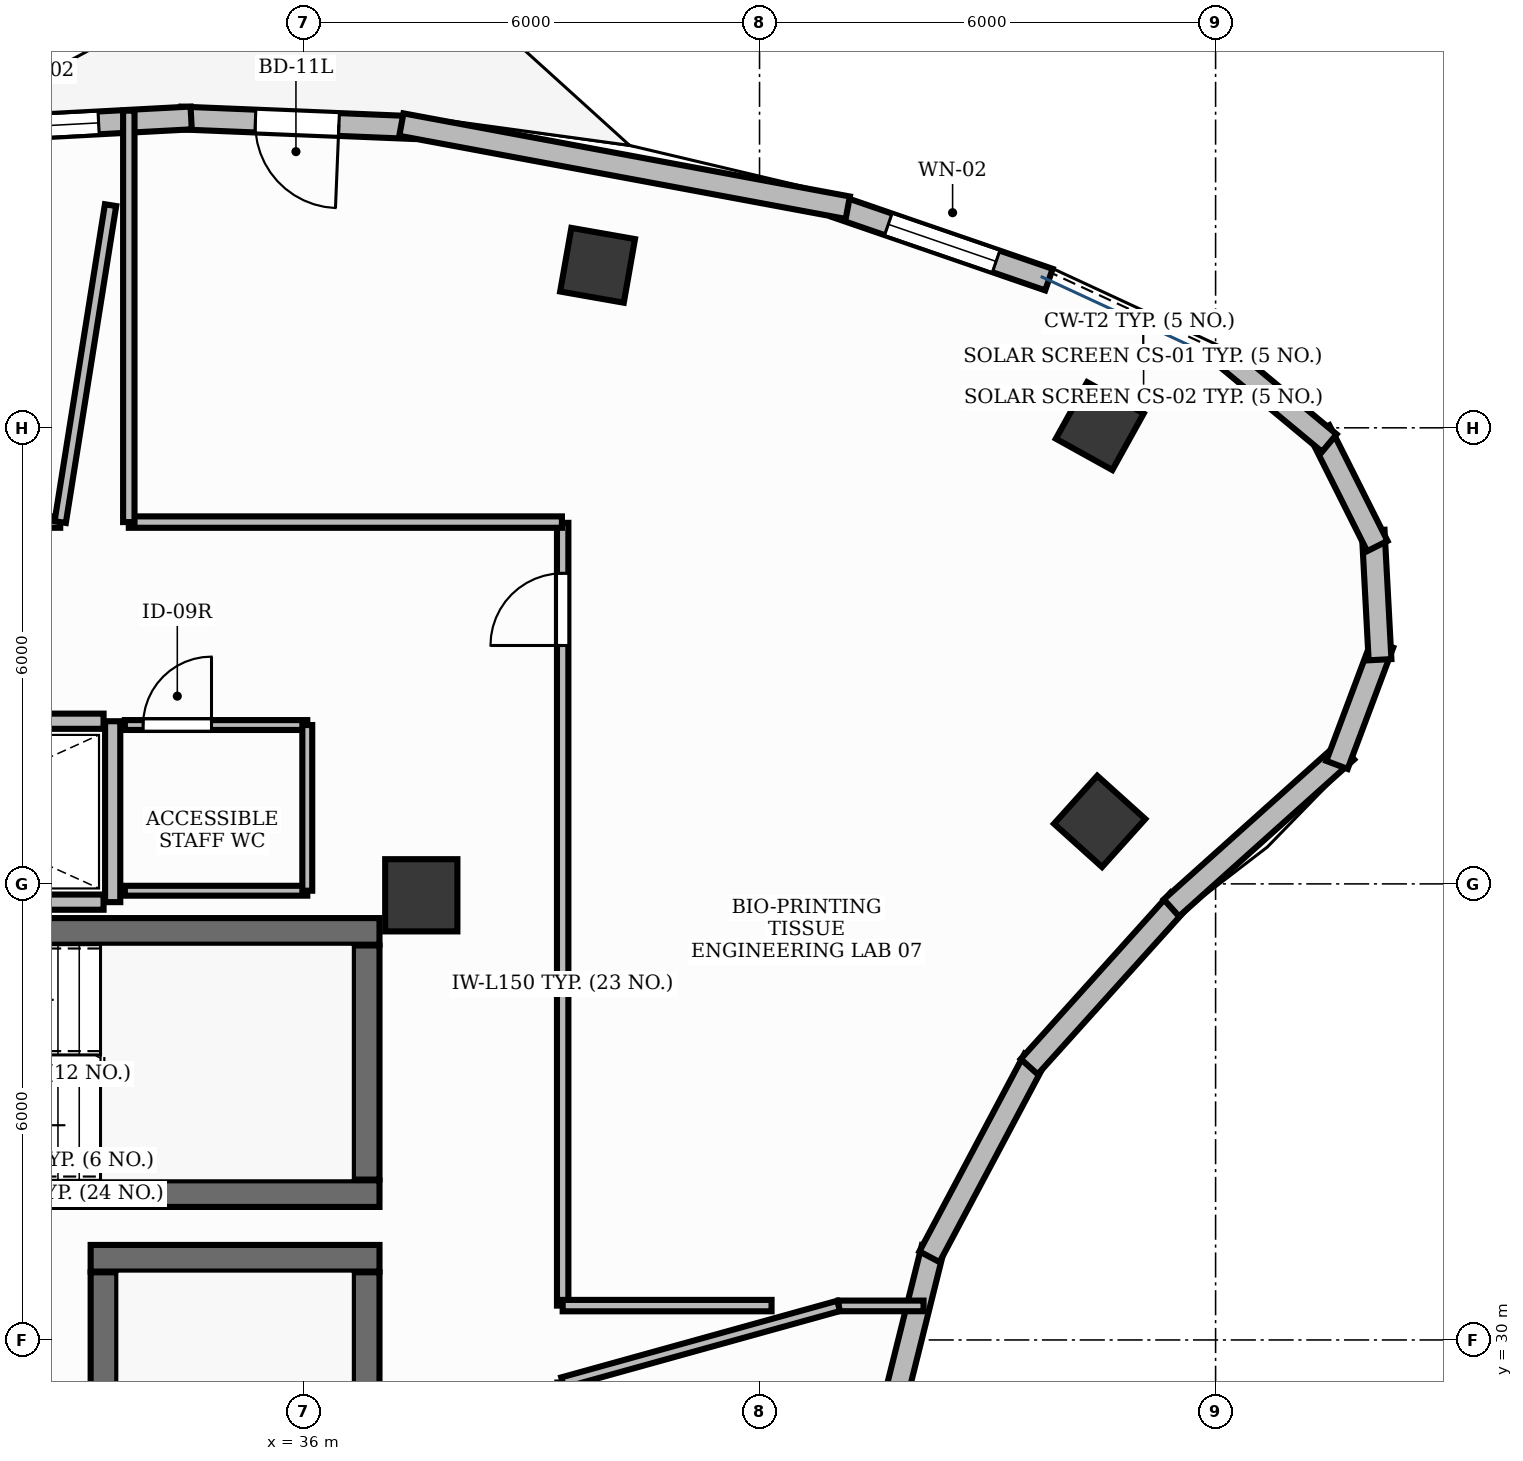
"""IFC4 building model, lengths in metres.
Left out: names, types, materials, properties, quantities, classifications, styles, units other than length and angle.
Written with IfcOpenShell. Run it as: python <this file> out.ifc"""

import sys

from ifc_helpers import new_model, si_unit, direction, frame, frame_2d, origin, origin_2d, place, context, subcontext, project, spatial, rectangle, extrude, element, fill, save


model = new_model("IFC4")
c1 = context("Model", 3, precision=1e-05, world=origin(), true_north=direction((0.0, 1.0)))
c2 = subcontext(c1, "Body", "Model", "MODEL_VIEW")
j1 = project(units=[si_unit("LENGTHUNIT", "METRE"), si_unit("PLANEANGLEUNIT", "RADIAN")], contexts=[c1])
p1 = place(None, origin())
s1 = spatial("IfcSite", under=j1, at=p1, CompositionType="ELEMENT")
p2 = place(p1, origin())
s2 = spatial("IfcBuilding", under=s1, at=p2, CompositionType="ELEMENT")
p3 = place(p2, frame((0.0, 0.0, 286.8)))
s3 = spatial("IfcBuildingStorey", under=s2, at=p3, CompositionType="ELEMENT", Elevation=286.8)
p4 = place(p3, frame((28.852, 35.375, 0.0), z_axis=(0.0, 0.0, 1.0), x_axis=(1.0, 0.0, 0.0)))
e1 = element("IfcWall", 1, at=p4, inside=s3, PredefinedType="SHEAR", context=c2, shape_type="SweptSolid", body=[
    extrude(rectangle(XDim=8.148, YDim=0.35, at=frame_2d((4.074, 0.0))), origin(), (0.0, 0.0, 1.0), 3.9),
])
p5 = place(p3, frame((28.45, 31.925, 0.0), z_axis=(0.0, 0.0, 1.0), x_axis=(1.0, 0.0, 0.0)))
e2 = element("IfcWall", 2, at=p5, inside=s3, PredefinedType="SHEAR", context=c2, shape_type="SweptSolid", body=[
    extrude(rectangle(XDim=8.55, YDim=0.35, at=frame_2d((4.275, 0.0))), origin(), (0.0, 0.0, 1.0), 3.9),
])
p6 = place(p3, frame((36.825, 32.11, 0.0), z_axis=(0.0, 0.0, 1.0), x_axis=(0.0, 1.0, 0.0)))
e3 = element("IfcWall", 3, at=p6, inside=s3, PredefinedType="SHEAR", context=c2, shape_type="SweptSolid", body=[
    extrude(rectangle(XDim=3.08, YDim=0.35, at=frame_2d((1.54, 0.0))), origin(), (0.0, 0.0, 1.0), 3.9),
])
p7 = place(p3, frame((33.2, 31.075, 0.0), z_axis=(0.0, 0.0, 1.0), x_axis=(1.0, 0.0, 0.0)))
e4 = element("IfcWall", 4, at=p7, inside=s3, PredefinedType="SHEAR", context=c2, shape_type="SweptSolid", body=[
    extrude(rectangle(XDim=3.8, YDim=0.35, at=frame_2d((1.9, 0.0))), origin(), (0.0, 0.0, 1.0), 3.9),
])
p8 = place(p3, frame((36.825, 23.11, 0.0), z_axis=(0.0, 0.0, 1.0), x_axis=(0.0, 1.0, 0.0)))
e5 = element("IfcWall", 5, at=p8, inside=s3, PredefinedType="SHEAR", context=c2, shape_type="SweptSolid", body=[
    extrude(rectangle(XDim=7.78, YDim=0.35, at=frame_2d((3.89, 0.0))), origin(), (0.0, 0.0, 1.0), 3.9),
])
p9 = place(p3, frame((33.375, 23.11, 0.0), z_axis=(0.0, 0.0, 1.0), x_axis=(0.0, 1.0, 0.0)))
e6 = element("IfcWall", 6, at=p9, inside=s3, PredefinedType="SHEAR", context=c2, shape_type="SweptSolid", body=[
    extrude(rectangle(XDim=7.78, YDim=0.35, at=frame_2d((3.89, 0.0))), origin(), (0.0, 0.0, 1.0), 3.9),
])
p10 = place(p9, frame((0.2, 0.0, 0.0)))
e7 = element("IfcOpeningElement", 7, at=p10, cuts=e6, PredefinedType="OPENING", context=c2, shape_type="SweptSolid", body=[
    extrude(rectangle(XDim=1.05, YDim=2.15, at=frame_2d((0.525, 1.075))), frame((0.0, 0.19, 0.0), z_axis=(0.0, -1.0, 0.0), x_axis=(1.0, 0.0, 0.0)), (0.0, 0.0, 1.0), 0.38),
])
p11 = place(p3, frame((37.55, 35.85, -0.0), z_axis=(0.0, 0.0, 1.0), x_axis=(1.0, 0.0, 0.0)))
e8 = element("IfcColumn", 8, at=p11, inside=s3, PredefinedType="PILASTER", context=c2, shape_type="SweptSolid", body=[
    extrude(rectangle(XDim=0.95, YDim=0.95, at=origin_2d()), origin(), (0.0, 0.0, 1.0), 3.901),
])
for number, where, z_axis, x_axis in (
    (9, (46.476, 42.023, -0.0), (0.0, 0.0, 1.0), (-0.875, 0.485, 0.0)),
    (10, (39.869, 44.138, -0.0), (0.0, 0.0, 1.0), (-0.985, 0.173, 0.0)),
    (11, (46.475, 36.823, -0.0), (0.0, 0.0, 1.0), (0.669, 0.743, 0.0)),
):
    element("IfcColumn", number, at=place(p3, frame(where, z_axis=z_axis, x_axis=x_axis)), inside=s3, PredefinedType="COLUMN", context=c2, shape_type="SweptSolid", body=[
        extrude(rectangle(XDim=0.85, YDim=0.85, at=origin_2d()), origin(), (0.0, 0.0, 1.0), 3.901),
    ])
p12 = place(p3, frame((45.807, 43.95, 0.0), z_axis=(0.0, 0.0, 1.0), x_axis=(-0.945564127376, 0.325435832416, 0.0)))
e12 = element("IfcWall", 12, at=p12, inside=s3, PredefinedType="STANDARD", context=c2, shape_type="SweptSolid", body=[
    extrude(rectangle(XDim=2.97, YDim=0.3, at=frame_2d((1.485, 0.0))), origin(), (0.0, 0.0, 1.0), 3.9),
])
p13 = place(p12, frame((0.735, 0.0, 0.95)))
e13 = element("IfcOpeningElement", 13, at=p13, cuts=e12, PredefinedType="OPENING", context=c2, shape_type="SweptSolid", body=[
    extrude(rectangle(XDim=1.5, YDim=1.8, at=frame_2d((0.75, 0.9))), frame((0.0, 0.165, 0.0), z_axis=(0.0, -1.0, 0.0), x_axis=(1.0, 0.0, 0.0)), (0.0, 0.0, 1.0), 0.33),
])
p14 = place(p3, frame((37.446, 45.95, 0.0), z_axis=(0.0, 0.0, 1.0), x_axis=(-0.999155735102, 0.041083050186, 0.0)))
e14 = element("IfcWall", 14, at=p14, inside=s3, PredefinedType="STANDARD", context=c2, shape_type="SweptSolid", body=[
    extrude(rectangle(XDim=3.061, YDim=0.3, at=frame_2d((1.53, 0.0))), origin(), (0.0, 0.0, 1.0), 3.47),
])
p15 = place(p14, frame((0.98, 0.0, 0.0)))
e15 = element("IfcOpeningElement", 15, at=p15, cuts=e14, PredefinedType="OPENING", context=c2, shape_type="SweptSolid", body=[
    extrude(rectangle(XDim=1.1, YDim=2.15, at=frame_2d((0.55, 1.075))), frame((0.0, 0.165, 0.0), z_axis=(0.0, -1.0, 0.0), x_axis=(1.0, 0.0, 0.0)), (0.0, 0.0, 1.0), 0.33),
])
p16 = place(p3, frame((34.522, 46.077, 0.0), z_axis=(0.0, 0.0, 1.0), x_axis=(-0.998578313912, -0.053304324252, 0.0)))
e16 = element("IfcWall", 16, at=p16, inside=s3, PredefinedType="STANDARD", context=c2, shape_type="SweptSolid", body=[
    extrude(rectangle(XDim=3.06, YDim=0.3, at=frame_2d((1.53, 0.0))), origin(), (0.0, 0.0, 1.0), 3.47),
])
p17 = place(p16, frame((1.219, 0.0, 0.95)))
e17 = element("IfcOpeningElement", 17, at=p17, cuts=e16, PredefinedType="OPENING", context=c2, shape_type="SweptSolid", body=[
    extrude(rectangle(XDim=1.5, YDim=1.8, at=frame_2d((0.75, 0.9))), frame((0.0, 0.165, 0.0), z_axis=(0.0, -1.0, 0.0), x_axis=(1.0, 0.0, 0.0)), (0.0, 0.0, 1.0), 0.33),
])
p18 = place(p3, frame((43.161, 44.896, 0.0), z_axis=(0.0, 0.0, 1.0), x_axis=(-0.983103205954, 0.183052141321, 0.0)))
e18 = element("IfcWall", 18, at=p18, inside=s3, PredefinedType="STANDARD", context=c2, shape_type="SweptSolid", body=[
    extrude(rectangle(XDim=5.974, YDim=0.3, at=frame_2d((2.987, 0.0))), origin(), (0.0, 0.0, 1.0), 3.47),
])
p19 = place(p3, frame((43.567, 28.35, 0.0), z_axis=(0.0, 0.0, 1.0), x_axis=(0.24195108751, 0.970288447449, 0.0)))
e19 = element("IfcWall", 19, at=p19, inside=s3, PredefinedType="STANDARD", context=c2, shape_type="SweptSolid", body=[
    extrude(rectangle(XDim=2.948, YDim=0.3, at=frame_2d((1.474, 0.0))), origin(), (0.0, 0.0, 1.0), 2.625),
])
p20 = place(p3, frame((44.236, 31.095, 0.0), z_axis=(0.0, 0.0, 1.0), x_axis=(0.469466013123, 0.882950543644, 0.0)))
e20 = element("IfcWall", 20, at=p20, inside=s3, PredefinedType="STANDARD", context=c2, shape_type="SweptSolid", body=[
    extrude(rectangle(XDim=2.948, YDim=0.3, at=frame_2d((1.474, 0.0))), origin(), (0.0, 0.0, 1.0), 2.625),
])
p21 = place(p3, frame((45.548, 33.596, 0.0), z_axis=(0.0, 0.0, 1.0), x_axis=(0.669166006669, 0.743112949368, 0.0)))
e21 = element("IfcWall", 21, at=p21, inside=s3, PredefinedType="STANDARD", context=c2, shape_type="SweptSolid", body=[
    extrude(rectangle(XDim=2.948, YDim=0.3, at=frame_2d((1.474, 0.0))), origin(), (0.0, 0.0, 1.0), 3.9),
])
p22 = place(p3, frame((47.419, 35.684, 0.0), z_axis=(0.0, 0.0, 1.0), x_axis=(0.744720921046, 0.667376018266, 0.0)))
e22 = element("IfcWall", 22, at=p22, inside=s3, PredefinedType="STANDARD", context=c2, shape_type="SweptSolid", body=[
    extrude(rectangle(XDim=3.094, YDim=0.3, at=frame_2d((1.547, 0.0))), origin(), (0.0, 0.0, 1.0), 3.9),
])
for number, where, z_axis, x_axis in (
    (23, (49.597, 37.565, 0.0), (0.0, 0.0, 1.0), (0.351, 0.936, 0.0)),
    (24, (50.163, 38.949, 0.0), (0.0, 0.0, 1.0), (-0.053, 0.999, 0.0)),
):
    element("IfcWall", number, at=place(p3, frame(where, z_axis=z_axis, x_axis=x_axis)), inside=s3, PredefinedType="STANDARD", context=c2, shape_type="SweptSolid", body=[
        extrude(rectangle(XDim=1.704, YDim=0.3, at=frame_2d((0.852, 0.0))), origin(), (0.0, 0.0, 1.0), 3.9),
    ])
for number, where, z_axis, x_axis in (
    (25, (50.128, 40.445, 0.0), (0.0, 0.0, 1.0), (-0.449, 0.894, 0.0)),
    (26, (49.496, 41.8, 0.0), (0.0, 0.0, 1.0), (-0.769, 0.639, 0.0)),
):
    element("IfcWall", number, at=place(p3, frame(where, z_axis=z_axis, x_axis=x_axis)), inside=s3, PredefinedType="STANDARD", context=c2, shape_type="SweptSolid", body=[
        extrude(rectangle(XDim=1.704, YDim=0.3, at=frame_2d((0.852, 0.0))), origin(), (0.0, 0.0, 1.0), 3.9),
    ])
p23 = place(p3, frame((33.49, 35.76, 0.0), z_axis=(0.0, 0.0, 1.0), x_axis=(0.0, 1.0, 0.0)))
e27 = element("IfcWall", 27, at=p23, inside=s3, PredefinedType="PARTITIONING", context=c2, shape_type="SweptSolid", body=[
    extrude(rectangle(XDim=2.38, YDim=0.2, at=frame_2d((1.19, 0.0))), origin(), (0.0, 0.0, 1.0), 2.22),
])
for number, where, z_axis, x_axis in (
    (28, (28.8, 35.76, 0.0), (0.0, 0.0, 1.0), (1.0, 0.0, 0.0)),
    (29, (28.8, 38.14, 0.0), (0.0, 0.0, 1.0), (1.0, 0.0, 0.0)),
):
    element("IfcWall", number, at=place(p3, frame(where, z_axis=z_axis, x_axis=x_axis)), inside=s3, PredefinedType="PARTITIONING", context=c2, shape_type="SweptSolid", body=[
        extrude(rectangle(XDim=4.57, YDim=0.2, at=frame_2d((2.285, 0.0))), origin(), (0.0, 0.0, 1.0), 2.22),
    ])
p24 = place(p3, frame((33.65, 38.09, 0.0), z_axis=(0.0, 0.0, 1.0), x_axis=(1.0, 0.0, 0.0)))
e30 = element("IfcWall", 30, at=p24, inside=s3, PredefinedType="PARTITIONING", context=c2, shape_type="SweptSolid", body=[
    extrude(rectangle(XDim=2.4, YDim=0.13, at=frame_2d((1.2, 0.0))), origin(), (0.0, 0.0, 1.0), 2.22),
])
p25 = place(p24, frame((0.24, 0.0, 0.0)))
e31 = element("IfcOpeningElement", 31, at=p25, cuts=e30, PredefinedType="OPENING", context=c2, shape_type="SweptSolid", body=[
    extrude(rectangle(XDim=0.9, YDim=2.15, at=frame_2d((0.45, 1.075))), frame((0.0, 0.08, 0.0), z_axis=(0.0, -1.0, 0.0), x_axis=(1.0, 0.0, 0.0)), (0.0, 0.0, 1.0), 0.16),
])
p26 = place(p3, frame((39.41, 30.452, 0.0), z_axis=(0.0, 0.0, 1.0), x_axis=(0.0, 1.0, 0.0)))
e32 = element("IfcWall", 32, at=p26, inside=s3, PredefinedType="PARTITIONING", context=c2, shape_type="SweptSolid", body=[
    extrude(rectangle(XDim=10.298, YDim=0.15, at=frame_2d((5.149, 0.0))), origin(), (0.0, 0.0, 1.0), 2.22),
])
p27 = place(p26, frame((8.684, 0.0, 0.0)))
e33 = element("IfcOpeningElement", 33, at=p27, cuts=e32, PredefinedType="OPENING", context=c2, shape_type="SweptSolid", body=[
    extrude(rectangle(XDim=0.95, YDim=2.15, at=frame_2d((0.475, 1.075))), frame((0.0, 0.09, 0.0), z_axis=(0.0, -1.0, 0.0), x_axis=(1.0, 0.0, 0.0)), (0.0, 0.0, 1.0), 0.18),
])
p28 = place(p3, frame((32.8, 40.76, 0.0), z_axis=(0.0, 0.0, 1.0), x_axis=(-1.0, 0.0, 0.0)))
e34 = element("IfcWall", 34, at=p28, inside=s3, PredefinedType="PARTITIONING", context=c2, shape_type="SweptSolid", body=[
    extrude(rectangle(XDim=10.126, YDim=0.15, at=frame_2d((5.063, 0.0))), origin(), (0.0, 0.0, 1.0), 2.22),
])
p29 = place(p28, frame((0.24, 0.0, 0.0)))
e35 = element("IfcOpeningElement", 35, at=p29, cuts=e34, PredefinedType="OPENING", context=c2, shape_type="SweptSolid", body=[
    extrude(rectangle(XDim=0.95, YDim=2.15, at=frame_2d((0.475, 1.075))), frame((0.0, 0.09, 0.0), z_axis=(0.0, -1.0, 0.0), x_axis=(1.0, 0.0, 0.0)), (0.0, 0.0, 1.0), 0.18),
])
p30 = place(p3, frame((36.05, 35.91, 0.0), z_axis=(0.0, 0.0, 1.0), x_axis=(-1.0, 0.0, 0.0)))
e36 = element("IfcWall", 36, at=p30, inside=s3, PredefinedType="PARTITIONING", context=c2, shape_type="SweptSolid", body=[
    extrude(rectangle(XDim=2.4, YDim=0.13, at=frame_2d((1.2, 0.0))), origin(), (0.0, 0.0, 1.0), 2.22),
])
p31 = place(p3, frame((36.05, 38.09, 0.0), z_axis=(0.0, 0.0, 1.0), x_axis=(0.0, -1.0, 0.0)))
e37 = element("IfcWall", 37, at=p31, inside=s3, PredefinedType="PARTITIONING", context=c2, shape_type="SweptSolid", body=[
    extrude(rectangle(XDim=2.18, YDim=0.13, at=frame_2d((1.09, 0.0))), origin(), (0.0, 0.0, 1.0), 2.22),
])
p32 = place(p3, frame((43.041, 30.448, 0.0), z_axis=(0.0, 0.0, 1.0), x_axis=(1.0, 0.0, 0.0)))
e38 = element("IfcWall", 38, at=p32, inside=s3, PredefinedType="PARTITIONING", context=c2, shape_type="SweptSolid", body=[
    extrude(rectangle(XDim=1.116, YDim=0.14, at=frame_2d((0.558, 0.0))), origin(), (0.0, 0.0, 1.0), 2.22),
])
p33 = place(p3, frame((39.41, 29.44, 0.0), z_axis=(0.0, 0.0, 1.0), x_axis=(0.963548536489, 0.267533582621, 0.0)))
e39 = element("IfcWall", 39, at=p33, inside=s3, PredefinedType="PARTITIONING", context=c2, shape_type="SweptSolid", body=[
    extrude(rectangle(XDim=3.768, YDim=0.14, at=frame_2d((1.884, 0.0))), origin(), (0.0, 0.0, 1.0), 2.22),
])
p34 = place(p3, frame((42.158, 30.452, 0.0), z_axis=(0.0, 0.0, 1.0), x_axis=(-1.0, 0.0, 0.0)))
e40 = element("IfcWall", 40, at=p34, inside=s3, PredefinedType="PARTITIONING", context=c2, shape_type="SweptSolid", body=[
    extrude(rectangle(XDim=2.748, YDim=0.15, at=frame_2d((1.374, 0.0))), origin(), (0.0, 0.0, 1.0), 2.22),
])
p35 = place(p3, frame((39.4, 40.76, 0.0), z_axis=(0.0, 0.0, 1.0), x_axis=(-1.0, 0.0, 0.0)))
e41 = element("IfcWall", 41, at=p35, inside=s3, PredefinedType="PARTITIONING", context=c2, shape_type="SweptSolid", body=[
    extrude(rectangle(XDim=5.698, YDim=0.15, at=frame_2d((2.849, 0.0))), origin(), (0.0, 0.0, 1.0), 2.22),
])
p36 = place(p3, frame((33.702, 40.76, 0.0), z_axis=(0.0, 0.0, 1.0), x_axis=(0.0, 1.0, 0.0)))
e42 = element("IfcWall", 42, at=p36, inside=s3, PredefinedType="PARTITIONING", context=c2, shape_type="SweptSolid", body=[
    extrude(rectangle(XDim=5.413, YDim=0.15, at=frame_2d((2.707, 0.0))), origin(), (0.0, 0.0, 1.0), 2.22),
])
p37 = place(p3, frame((33.462, 44.93, 0.0), z_axis=(0.0, 0.0, 1.0), x_axis=(-0.156883039615, -0.987617188936, 0.0)))
e43 = element("IfcWall", 43, at=p37, inside=s3, PredefinedType="PARTITIONING", context=c2, shape_type="SweptSolid", body=[
    extrude(rectangle(XDim=4.222, YDim=0.15, at=frame_2d((2.111, 0.0))), origin(), (0.0, 0.0, 1.0), 2.22),
])
p38 = place(p13, origin())
e44 = element("IfcWindow", 44, at=p38, inside=s3, PartitioningType="DOUBLE_PANEL_VERTICAL", PredefinedType="WINDOW", context=c2, shape_type="SweptSolid", body=[
    extrude(rectangle(XDim=1.5, YDim=1.8, at=frame_2d((0.75, 0.9))), frame((0.0, 0.03, 0.0), z_axis=(0.0, -1.0, 0.0), x_axis=(1.0, 0.0, 0.0)), (0.0, 0.0, 1.0), 0.06),
])
fill(e13, e44)
p39 = place(p15, origin())
e45 = element("IfcDoor", 45, at=p39, inside=s3, OperationType="SINGLE_SWING_LEFT", PredefinedType="DOOR", context=c2, shape_type="SweptSolid", body=[
    extrude(rectangle(XDim=1.1, YDim=2.15, at=frame_2d((0.55, 1.075))), frame((0.0, 0.025, 0.0), z_axis=(0.0, -1.0, 0.0), x_axis=(1.0, 0.0, 0.0)), (0.0, 0.0, 1.0), 0.05),
])
fill(e15, e45)
p40 = place(p17, origin())
e46 = element("IfcWindow", 46, at=p40, inside=s3, PartitioningType="DOUBLE_PANEL_VERTICAL", PredefinedType="WINDOW", context=c2, shape_type="SweptSolid", body=[
    extrude(rectangle(XDim=1.5, YDim=1.8, at=frame_2d((0.75, 0.9))), frame((0.0, 0.03, 0.0), z_axis=(0.0, -1.0, 0.0), x_axis=(1.0, 0.0, 0.0)), (0.0, 0.0, 1.0), 0.06),
])
fill(e17, e46)
p41 = place(p25, origin())
e47 = element("IfcDoor", 47, at=p41, inside=s3, OperationType="SINGLE_SWING_RIGHT", PredefinedType="DOOR", context=c2, shape_type="SweptSolid", body=[
    extrude(rectangle(XDim=0.9, YDim=2.15, at=frame_2d((0.45, 1.075))), frame((0.0, 0.025, 0.0), z_axis=(0.0, -1.0, 0.0), x_axis=(1.0, 0.0, 0.0)), (0.0, 0.0, 1.0), 0.05),
])
fill(e31, e47)
p42 = place(p27, origin())
e48 = element("IfcDoor", 48, at=p42, inside=s3, OperationType="SINGLE_SWING_LEFT", PredefinedType="DOOR", context=c2, shape_type="SweptSolid", body=[
    extrude(rectangle(XDim=0.95, YDim=2.15, at=frame_2d((0.475, 1.075))), frame((0.0, 0.025, 0.0), z_axis=(0.0, -1.0, 0.0), x_axis=(1.0, 0.0, 0.0)), (0.0, 0.0, 1.0), 0.05),
])
fill(e33, e48)
save(model, sys.argv[1])
